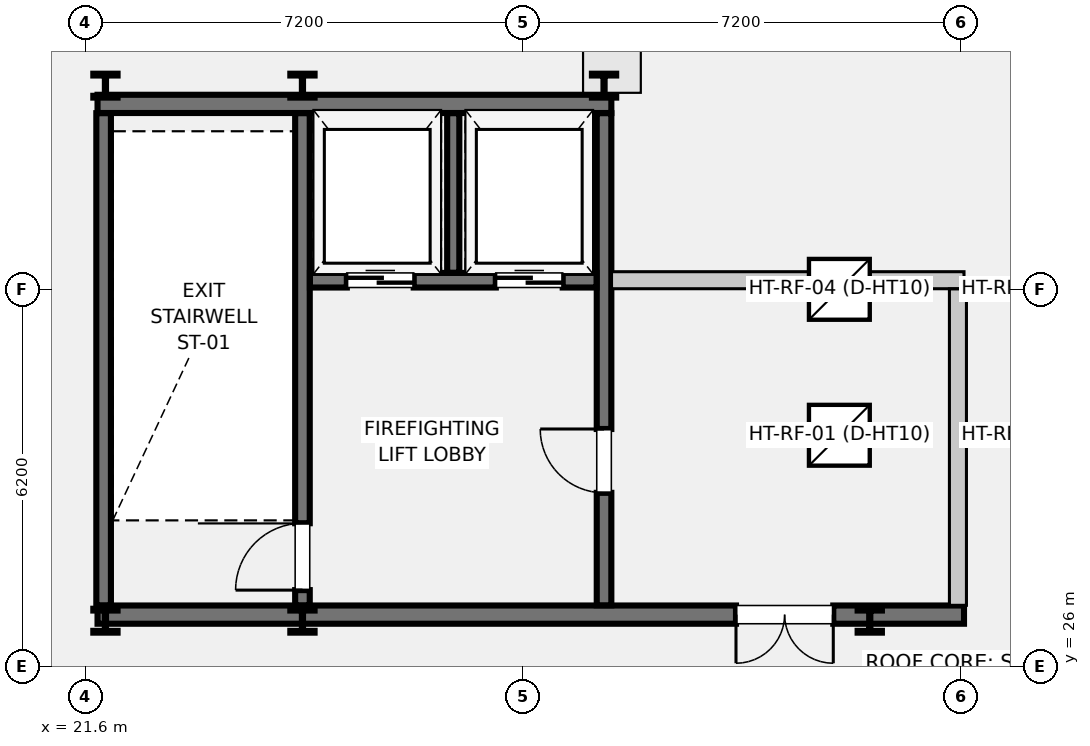
"""IFC4 building model, lengths in metres.
Left out: names, types, materials, properties, quantities, classifications, styles, units other than length and angle.
Written with IfcOpenShell. Run it as: python <this file> out.ifc"""

import sys

from ifc_helpers import new_model, si_unit, direction, frame, frame_2d, origin, origin_2d, place, context, subcontext, project, spatial, rectangle, i_section, extrude, element, fill, save


model = new_model("IFC4")
c1 = context("Model", 3, precision=1e-05, world=origin(), true_north=direction((0.0, 1.0)))
c2 = subcontext(c1, "Body", "Model", "MODEL_VIEW")
j1 = project(units=[si_unit("LENGTHUNIT", "METRE"), si_unit("PLANEANGLEUNIT", "RADIAN")], contexts=[c1])
p1 = place(None, origin())
s1 = spatial("IfcSite", under=j1, at=p1, CompositionType="ELEMENT")
p2 = place(p1, origin())
s2 = spatial("IfcBuilding", under=s1, at=p2, CompositionType="ELEMENT")
p3 = place(p2, frame((0.0, 0.0, 300.5)))
s3 = spatial("IfcBuildingStorey", under=s2, at=p3, CompositionType="ELEMENT", Elevation=300.5)
for number, where, z_axis, x_axis in (
    (1, (21.93, 35.55, 0.0), (0.0, 0.0, 1.0), (1.0, 0.0, 0.0)),
    (2, (25.17, 35.55, 0.0), (0.0, 0.0, 1.0), (1.0, 0.0, 0.0)),
    (3, (30.13, 35.55, 0.0), (0.0, 0.0, 1.0), (1.0, 0.0, 0.0)),
    (4, (21.93, 26.75, 0.0), (0.0, 0.0, 1.0), (1.0, 0.0, 0.0)),
    (5, (25.17, 26.75, 0.0), (0.0, 0.0, 1.0), (1.0, 0.0, 0.0)),
    (6, (34.5, 26.75, 0.0), (0.0, 0.0, 1.0), (1.0, 0.0, 0.0)),
):
    element("IfcColumn", number, at=place(p3, frame(where, z_axis=z_axis, x_axis=x_axis)), inside=s3, PredefinedType="COLUMN", context=c2, shape_type="SweptSolid", body=[
        extrude(i_section(OverallWidth=0.399, OverallDepth=0.393, WebThickness=0.019, FlangeThickness=0.03, at=origin_2d()), origin(), (0.0, 0.0, 1.0), 5.42),
    ])
p4 = place(p3, frame((21.8, 26.85, 0.0), z_axis=(0.0, 0.0, 1.0), x_axis=(1.0, 0.0, 0.0)))
e7 = element("IfcWall", 7, at=p4, inside=s3, PredefinedType="STANDARD", context=c2, shape_type="SweptSolid", body=[
    extrude(rectangle(XDim=14.25, YDim=0.3, at=frame_2d((7.125, 0.0))), origin(), (0.0, 0.0, 1.0), 3.6),
])
p5 = place(p4, frame((10.5, 0.0, 0.0)))
e8 = element("IfcOpeningElement", 8, at=p5, cuts=e7, PredefinedType="OPENING", context=c2, shape_type="SweptSolid", body=[
    extrude(rectangle(XDim=1.6, YDim=2.15, at=frame_2d((0.8, 1.075))), frame((0.0, 0.16, 0.0), z_axis=(0.0, -1.0, 0.0), x_axis=(1.0, 0.0, 0.0)), (0.0, 0.0, 1.0), 0.32),
])
p6 = place(p3, frame((21.8, 35.25, 0.0), z_axis=(0.0, 0.0, 1.0), x_axis=(1.0, 0.0, 0.0)))
e9 = element("IfcWall", 9, at=p6, inside=s3, PredefinedType="STANDARD", context=c2, shape_type="SweptSolid", body=[
    extrude(rectangle(XDim=8.45, YDim=0.3, at=frame_2d((4.225, 0.0))), origin(), (0.0, 0.0, 1.0), 3.6),
])
p7 = place(p3, frame((21.9, 27.003, 0.0), z_axis=(0.0, 0.0, 1.0), x_axis=(0.0, 1.0, 0.0)))
e10 = element("IfcWall", 10, at=p7, inside=s3, PredefinedType="SHEAR", context=c2, shape_type="SweptSolid", body=[
    extrude(rectangle(XDim=8.094, YDim=0.24, at=frame_2d((4.047, 0.0))), origin(), (0.0, 0.0, 1.0), 3.6),
])
p8 = place(p3, frame((25.17, 27.003, 0.0), z_axis=(0.0, 0.0, 1.0), x_axis=(0.0, 1.0, 0.0)))
e11 = element("IfcWall", 11, at=p8, inside=s3, PredefinedType="SHEAR", context=c2, shape_type="SweptSolid", body=[
    extrude(rectangle(XDim=8.094, YDim=0.24, at=frame_2d((4.047, 0.0))), origin(), (0.0, 0.0, 1.0), 3.6),
])
p9 = place(p8, frame((0.25, 0.0, 0.0)))
e12 = element("IfcOpeningElement", 12, at=p9, cuts=e11, PredefinedType="OPENING", context=c2, shape_type="SweptSolid", body=[
    extrude(rectangle(XDim=1.1, YDim=2.0, at=frame_2d((0.55, 1.0))), frame((0.0, 0.13, 0.0), z_axis=(0.0, -1.0, 0.0), x_axis=(1.0, 0.0, 0.0)), (0.0, 0.0, 1.0), 0.26),
])
p10 = place(p3, frame((30.13, 27.003, 0.0), z_axis=(0.0, 0.0, 1.0), x_axis=(0.0, 1.0, 0.0)))
e13 = element("IfcWall", 13, at=p10, inside=s3, PredefinedType="SHEAR", context=c2, shape_type="SweptSolid", body=[
    extrude(rectangle(XDim=8.094, YDim=0.24, at=frame_2d((4.047, 0.0))), origin(), (0.0, 0.0, 1.0), 3.6),
])
p11 = place(p10, frame((1.85, 0.0, 0.0)))
e14 = element("IfcOpeningElement", 14, at=p11, cuts=e13, PredefinedType="OPENING", context=c2, shape_type="SweptSolid", body=[
    extrude(rectangle(XDim=1.05, YDim=2.0, at=frame_2d((0.525, 1.0))), frame((0.0, 0.13, 0.0), z_axis=(0.0, -1.0, 0.0), x_axis=(1.0, 0.0, 0.0)), (0.0, 0.0, 1.0), 0.26),
])
p12 = place(p3, frame((25.293, 32.35, 0.0), z_axis=(0.0, 0.0, 1.0), x_axis=(1.0, 0.0, 0.0)))
e15 = element("IfcWall", 15, at=p12, inside=s3, PredefinedType="SHEAR", context=c2, shape_type="SweptSolid", body=[
    extrude(rectangle(XDim=4.714, YDim=0.24, at=frame_2d((2.357, 0.0))), origin(), (0.0, 0.0, 1.0), 3.6),
])
p13 = place(p12, frame((0.607, 0.0, 0.0)))
e16 = element("IfcOpeningElement", 16, at=p13, cuts=e15, PredefinedType="OPENING", context=c2, shape_type="SweptSolid", body=[
    extrude(rectangle(XDim=1.1, YDim=2.0, at=frame_2d((0.55, 1.0))), frame((0.0, 0.13, 0.0), z_axis=(0.0, -1.0, 0.0), x_axis=(1.0, 0.0, 0.0)), (0.0, 0.0, 1.0), 0.26),
])
p14 = place(p12, frame((3.057, 0.0, 0.0)))
e17 = element("IfcOpeningElement", 17, at=p14, cuts=e15, PredefinedType="OPENING", context=c2, shape_type="SweptSolid", body=[
    extrude(rectangle(XDim=1.1, YDim=2.0, at=frame_2d((0.55, 1.0))), frame((0.0, 0.13, 0.0), z_axis=(0.0, -1.0, 0.0), x_axis=(1.0, 0.0, 0.0)), (0.0, 0.0, 1.0), 0.26),
])
p15 = place(p3, frame((27.65, 32.473, 0.0), z_axis=(0.0, 0.0, 1.0), x_axis=(0.0, 1.0, 0.0)))
e18 = element("IfcWall", 18, at=p15, inside=s3, PredefinedType="SHEAR", context=c2, shape_type="SweptSolid", body=[
    extrude(rectangle(XDim=2.624, YDim=0.2, at=frame_2d((1.312, 0.0))), origin(), (0.0, 0.0, 1.0), 3.6),
])
p16 = place(p3, frame((30.253, 32.35, 0.0), z_axis=(0.0, 0.0, 1.0), x_axis=(1.0, 0.0, 0.0)))
e19 = element("IfcWall", 19, at=p16, inside=s3, PredefinedType="STANDARD", context=c2, shape_type="SweptSolid", body=[
    extrude(rectangle(XDim=5.797, YDim=0.28, at=frame_2d((2.898, 0.0))), origin(), (0.0, 0.0, 1.0), 3.6),
])
p17 = place(p3, frame((35.95, 27.003, 0.0), z_axis=(0.0, 0.0, 1.0), x_axis=(0.0, 1.0, 0.0)))
e20 = element("IfcWall", 20, at=p17, inside=s3, PredefinedType="STANDARD", context=c2, shape_type="SweptSolid", body=[
    extrude(rectangle(XDim=5.204, YDim=0.28, at=frame_2d((2.602, 0.0))), origin(), (0.0, 0.0, 1.0), 3.6),
])
p18 = place(p3, frame((0.0, 0.0, 5.42)))
p19 = place(p18, frame((34.0, 29.8, 0.0)))
p20 = place(p19, frame((0.0, 0.0, 1.03)))
e21 = element("IfcDoor", 21, at=p20, inside=s3, OperationType="SINGLE_SWING_LEFT", PredefinedType="TRAPDOOR", context=c2, shape_type="SweptSolid", body=[
    extrude(rectangle(XDim=1.0, YDim=1.0, at=origin_2d()), origin(), (0.0, 0.0, 1.0), 0.05),
])
p21 = place(p18, frame((34.0, 32.2, 0.0)))
p22 = place(p21, frame((0.0, 0.0, 1.03)))
e22 = element("IfcDoor", 22, at=p22, inside=s3, OperationType="SINGLE_SWING_LEFT", PredefinedType="TRAPDOOR", context=c2, shape_type="SweptSolid", body=[
    extrude(rectangle(XDim=1.0, YDim=1.0, at=origin_2d()), origin(), (0.0, 0.0, 1.0), 0.05),
])
p23 = place(p9, origin())
e23 = element("IfcDoor", 23, at=p23, inside=s3, OperationType="SINGLE_SWING_LEFT", PredefinedType="DOOR", context=c2, shape_type="SweptSolid", body=[
    extrude(rectangle(XDim=1.1, YDim=2.0, at=frame_2d((0.55, 1.0))), frame((0.0, 0.025, 0.0), z_axis=(0.0, -1.0, 0.0), x_axis=(1.0, 0.0, 0.0)), (0.0, 0.0, 1.0), 0.05),
])
fill(e12, e23)
p24 = place(p11, origin())
e24 = element("IfcDoor", 24, at=p24, inside=s3, OperationType="SINGLE_SWING_RIGHT", PredefinedType="DOOR", context=c2, shape_type="SweptSolid", body=[
    extrude(rectangle(XDim=1.05, YDim=2.0, at=frame_2d((0.525, 1.0))), frame((0.0, 0.025, 0.0), z_axis=(0.0, -1.0, 0.0), x_axis=(1.0, 0.0, 0.0)), (0.0, 0.0, 1.0), 0.05),
])
fill(e14, e24)
p25 = place(p13, origin())
e25 = element("IfcDoor", 25, at=p25, inside=s3, OperationType="DOUBLE_DOOR_SLIDING", PredefinedType="USERDEFINED", context=c2, shape_type="SweptSolid", body=[
    extrude(rectangle(XDim=1.1, YDim=2.0, at=frame_2d((0.55, 1.0))), frame((0.0, 0.025, 0.0), z_axis=(0.0, -1.0, 0.0), x_axis=(1.0, 0.0, 0.0)), (0.0, 0.0, 1.0), 0.05),
])
fill(e16, e25)
p26 = place(p14, origin())
e26 = element("IfcDoor", 26, at=p26, inside=s3, OperationType="DOUBLE_DOOR_SLIDING", PredefinedType="USERDEFINED", context=c2, shape_type="SweptSolid", body=[
    extrude(rectangle(XDim=1.1, YDim=2.0, at=frame_2d((0.55, 1.0))), frame((0.0, 0.025, 0.0), z_axis=(0.0, -1.0, 0.0), x_axis=(1.0, 0.0, 0.0)), (0.0, 0.0, 1.0), 0.05),
])
fill(e17, e26)
p27 = place(p5, frame((1.6, 0.0, 0.0), z_axis=(0.0, 0.0, 1.0), x_axis=(-1.0, 0.0, 0.0)))
e27 = element("IfcDoor", 27, at=p27, inside=s3, OperationType="DOUBLE_DOOR_SINGLE_SWING", PredefinedType="DOOR", context=c2, shape_type="SweptSolid", body=[
    extrude(rectangle(XDim=1.6, YDim=2.15, at=frame_2d((0.8, 1.075))), frame((0.0, 0.025, 0.0), z_axis=(0.0, -1.0, 0.0), x_axis=(1.0, 0.0, 0.0)), (0.0, 0.0, 1.0), 0.05),
])
fill(e8, e27)
save(model, sys.argv[1])
